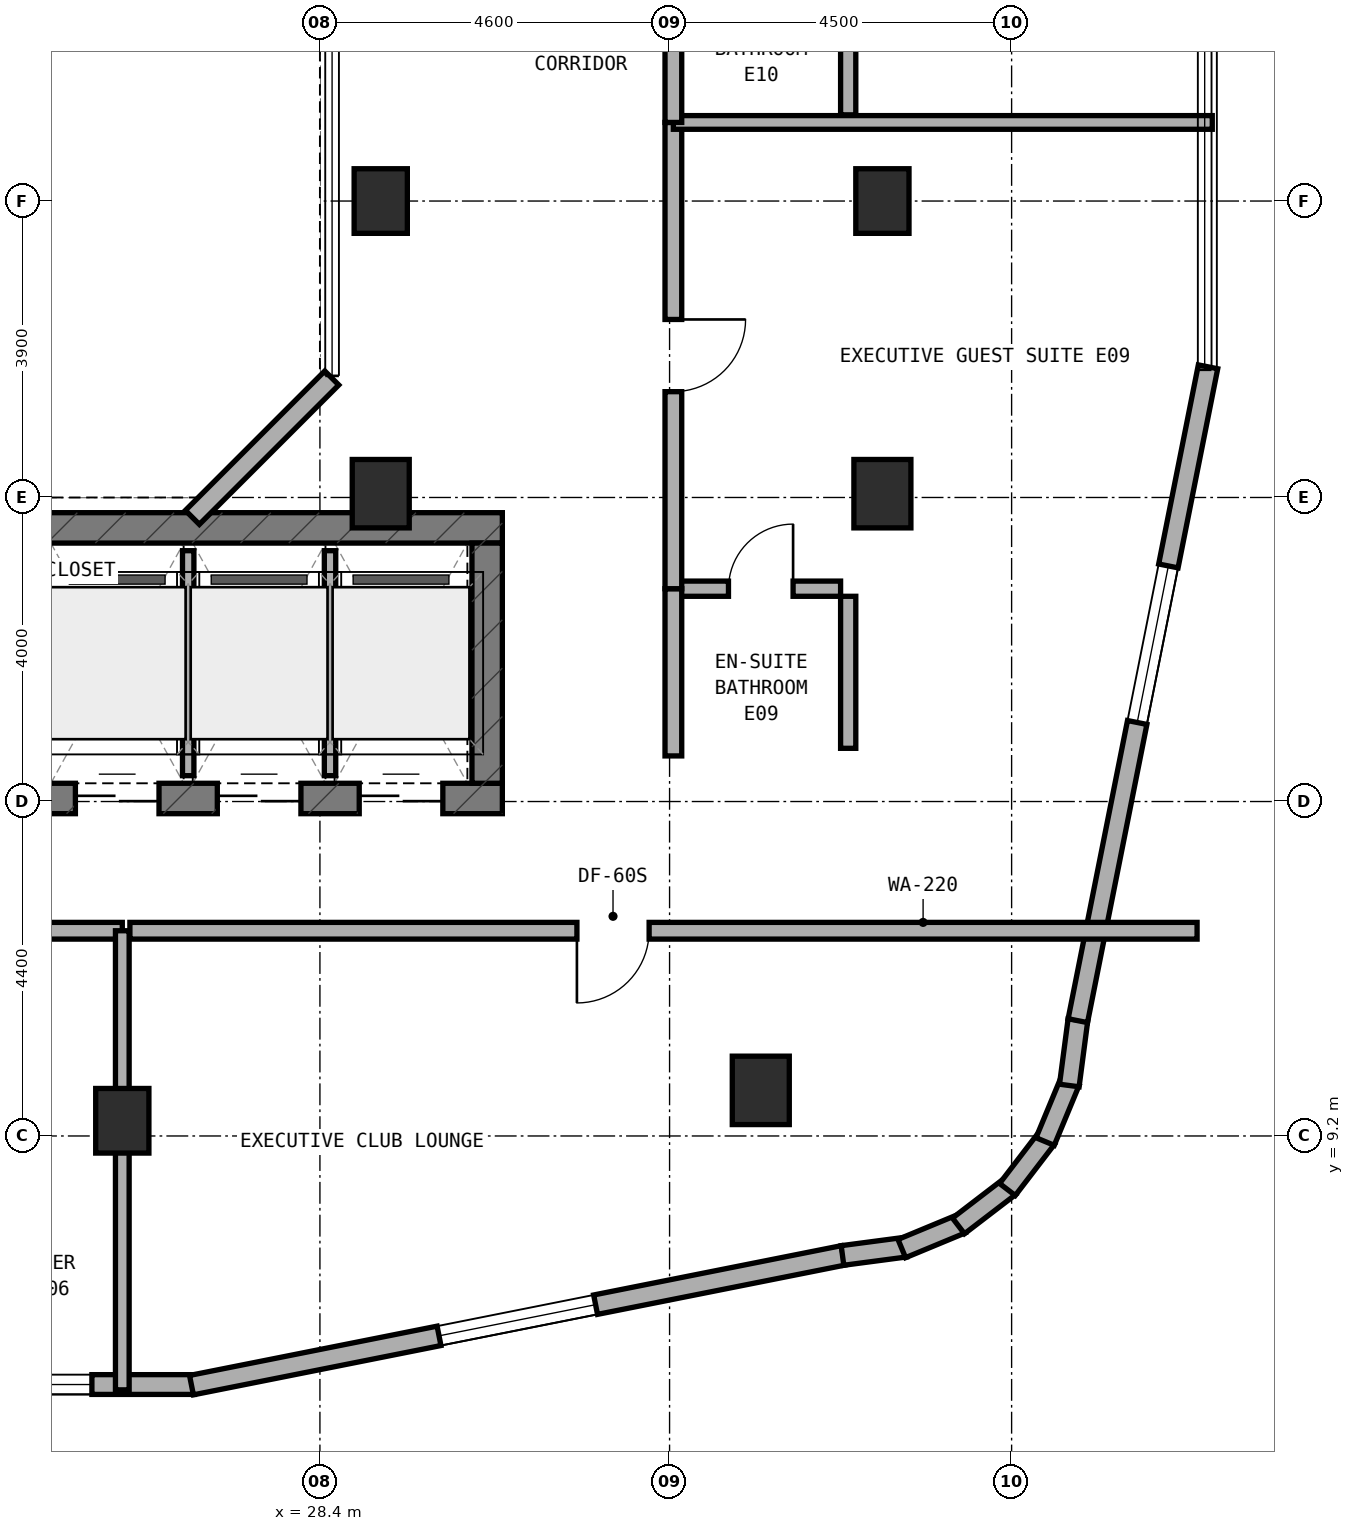
"""IFC4 building model, lengths in metres.
Left out: names, types, materials, properties, quantities, classifications, styles, units other than length and angle.
Written with IfcOpenShell. Run it as: python <this file> out.ifc"""

import sys

from ifc_helpers import new_model, si_unit, direction, frame, frame_2d, origin, origin_2d, place, context, subcontext, project, spatial, rectangle, extrude, element, fill, save


model = new_model("IFC4")
c1 = context("Model", 3, precision=1e-05, world=origin(), true_north=direction((0.0, 1.0)))
c2 = subcontext(c1, "Body", "Model", "MODEL_VIEW")
j1 = project(units=[si_unit("LENGTHUNIT", "METRE"), si_unit("PLANEANGLEUNIT", "RADIAN")], contexts=[c1])
p1 = place(None, origin())
s1 = spatial("IfcSite", under=j1, at=p1, CompositionType="ELEMENT")
p2 = place(p1, origin())
s2 = spatial("IfcBuilding", under=s1, at=p2, CompositionType="ELEMENT")
p3 = place(p2, frame((0.0, 0.0, 220.7)))
s3 = spatial("IfcBuildingStorey", under=s2, at=p3, CompositionType="ELEMENT", Elevation=220.7)
p4 = place(p3, frame((6.4, 13.64, 0.0), z_axis=(0.0, 0.0, 1.0), x_axis=(1.0, 0.0, 0.0)))
e1 = element("IfcWall", 1, at=p4, inside=s3, PredefinedType="SHEAR", context=c2, shape_type="SweptSolid", body=[
    extrude(rectangle(XDim=24.4, YDim=0.4, at=frame_2d((12.2, 0.0))), origin(), (0.0, 0.0, 1.0), 3.6),
])
p5 = place(p4, frame((9.15, 0.0, 0.0)))
e2 = element("IfcOpeningElement", 2, at=p5, cuts=e1, PredefinedType="OPENING", context=c2, shape_type="SweptSolid", body=[
    extrude(rectangle(XDim=1.2, YDim=2.15, at=frame_2d((0.6, 1.075))), frame((0.0, 0.21, 0.0), z_axis=(0.0, -1.0, 0.0), x_axis=(1.0, 0.0, 0.0)), (0.0, 0.0, 1.0), 0.42),
])
p6 = place(p4, frame((16.94, 0.0, 0.0)))
e3 = element("IfcOpeningElement", 3, at=p6, cuts=e1, PredefinedType="OPENING", context=c2, shape_type="SweptSolid", body=[
    extrude(rectangle(XDim=0.85, YDim=2.1, at=frame_2d((0.425, 1.05))), frame((0.0, 0.21, 0.0), z_axis=(0.0, -1.0, 0.0), x_axis=(1.0, 0.0, 0.0)), (0.0, 0.0, 1.0), 0.42),
])
p7 = place(p4, frame((18.783, 0.0, 0.0)))
e4 = element("IfcOpeningElement", 4, at=p7, cuts=e1, PredefinedType="OPENING", context=c2, shape_type="SweptSolid", body=[
    extrude(rectangle(XDim=1.1, YDim=2.15, at=frame_2d((0.55, 1.075))), frame((0.0, 0.21, 0.0), z_axis=(0.0, -1.0, 0.0), x_axis=(1.0, 0.0, 0.0)), (0.0, 0.0, 1.0), 0.42),
])
p8 = place(p4, frame((20.65, 0.0, 0.0)))
e5 = element("IfcOpeningElement", 5, at=p8, cuts=e1, PredefinedType="OPENING", context=c2, shape_type="SweptSolid", body=[
    extrude(rectangle(XDim=1.1, YDim=2.15, at=frame_2d((0.55, 1.075))), frame((0.0, 0.21, 0.0), z_axis=(0.0, -1.0, 0.0), x_axis=(1.0, 0.0, 0.0)), (0.0, 0.0, 1.0), 0.42),
])
p9 = place(p4, frame((22.517, 0.0, 0.0)))
e6 = element("IfcOpeningElement", 6, at=p9, cuts=e1, PredefinedType="OPENING", context=c2, shape_type="SweptSolid", body=[
    extrude(rectangle(XDim=1.1, YDim=2.15, at=frame_2d((0.55, 1.075))), frame((0.0, 0.21, 0.0), z_axis=(0.0, -1.0, 0.0), x_axis=(1.0, 0.0, 0.0)), (0.0, 0.0, 1.0), 0.42),
])
p10 = place(p3, frame((6.4, 17.2, 0.0), z_axis=(0.0, 0.0, 1.0), x_axis=(1.0, 0.0, 0.0)))
e7 = element("IfcWall", 7, at=p10, inside=s3, PredefinedType="SHEAR", context=c2, shape_type="SweptSolid", body=[
    extrude(rectangle(XDim=24.4, YDim=0.4, at=frame_2d((12.2, 0.0))), origin(), (0.0, 0.0, 1.0), 3.6),
])
p11 = place(p3, frame((30.6, 13.84, 0.0), z_axis=(0.0, 0.0, 1.0), x_axis=(0.0, 1.0, 0.0)))
e8 = element("IfcWall", 8, at=p11, inside=s3, PredefinedType="SHEAR", context=c2, shape_type="SweptSolid", body=[
    extrude(rectangle(XDim=3.16, YDim=0.4, at=frame_2d((1.58, 0.0))), origin(), (0.0, 0.0, 1.0), 3.6),
])
p12 = place(p3, frame((25.8, 9.4, 0.0), z_axis=(0.0, 0.0, 1.0), x_axis=(1.0, 0.0, 0.0)))
e9 = element("IfcColumn", 9, at=p12, inside=s3, PredefinedType="COLUMN", context=c2, shape_type="SweptSolid", body=[
    extrude(rectangle(XDim=0.7, YDim=0.85, at=origin_2d()), origin(), (0.0, 0.0, 1.0), 3.6),
])
p13 = place(p3, frame((34.2, 9.8, 0.0), z_axis=(0.0, 0.0, 1.0), x_axis=(1.0, 0.0, 0.0)))
e10 = element("IfcColumn", 10, at=p13, inside=s3, PredefinedType="COLUMN", context=c2, shape_type="SweptSolid", body=[
    extrude(rectangle(XDim=0.75, YDim=0.9, at=origin_2d()), origin(), (0.0, 0.0, 1.0), 3.6),
])
p14 = place(p3, frame((35.8, 21.5, 0.0), z_axis=(0.0, 0.0, 1.0), x_axis=(1.0, 0.0, 0.0)))
e11 = element("IfcColumn", 11, at=p14, inside=s3, PredefinedType="COLUMN", context=c2, shape_type="SweptSolid", body=[
    extrude(rectangle(XDim=0.7, YDim=0.85, at=origin_2d()), origin(), (0.0, 0.0, 1.0), 3.6),
])
for number, where, z_axis, x_axis in (
    (12, (35.8, 17.65, 0.0), (0.0, 0.0, 1.0), (1.0, 0.0, 0.0)),
    (13, (29.2, 17.65, 0.0), (0.0, 0.0, 1.0), (1.0, 0.0, 0.0)),
):
    element("IfcColumn", number, at=place(p3, frame(where, z_axis=z_axis, x_axis=x_axis)), inside=s3, PredefinedType="COLUMN", context=c2, shape_type="SweptSolid", body=[
        extrude(rectangle(XDim=0.75, YDim=0.9, at=origin_2d()), origin(), (0.0, 0.0, 1.0), 3.6),
    ])
p15 = place(p3, frame((29.2, 21.5, 0.0), z_axis=(0.0, 0.0, 1.0), x_axis=(1.0, 0.0, 0.0)))
e14 = element("IfcColumn", 14, at=p15, inside=s3, PredefinedType="COLUMN", context=c2, shape_type="SweptSolid", body=[
    extrude(rectangle(XDim=0.7, YDim=0.85, at=origin_2d()), origin(), (0.0, 0.0, 1.0), 3.6),
])
p16 = place(p3, frame((15.215, 5.93, 0.0), z_axis=(0.0, 0.0, 1.0), x_axis=(1.0, 0.0, 0.0)))
e15 = element("IfcWall", 15, at=p16, inside=s3, PredefinedType="STANDARD", context=c2, shape_type="SweptSolid", body=[
    extrude(rectangle(XDim=11.535, YDim=0.26, at=frame_2d((5.768, 0.0))), origin(), (0.0, 0.0, 1.0), 3.32),
])
p17 = place(p16, frame((5.185, 0.0, 0.0)))
e16 = element("IfcOpeningElement", 16, at=p17, cuts=e15, PredefinedType="OPENING", context=c2, shape_type="SweptSolid", body=[
    extrude(rectangle(XDim=1.2, YDim=2.15, at=frame_2d((0.6, 1.075))), frame((0.0, 0.14, 0.0), z_axis=(0.0, -1.0, 0.0), x_axis=(1.0, 0.0, 0.0)), (0.0, 0.0, 1.0), 0.28),
])
p18 = place(p16, frame((1.437, 0.0, 0.85)))
e17 = element("IfcOpeningElement", 17, at=p18, cuts=e15, PredefinedType="OPENING", context=c2, shape_type="SweptSolid", body=[
    extrude(rectangle(XDim=2.1, YDim=1.5, at=frame_2d((1.05, 0.75))), frame((0.0, 0.14, 0.0), z_axis=(0.0, -1.0, 0.0), x_axis=(1.0, 0.0, 0.0)), (0.0, 0.0, 1.0), 0.28),
])
p19 = place(p16, frame((8.085, 0.0, 0.85)))
e18 = element("IfcOpeningElement", 18, at=p19, cuts=e15, PredefinedType="OPENING", context=c2, shape_type="SweptSolid", body=[
    extrude(rectangle(XDim=2.1, YDim=1.5, at=frame_2d((1.05, 0.75))), frame((0.0, 0.14, 0.0), z_axis=(0.0, -1.0, 0.0), x_axis=(1.0, 0.0, 0.0)), (0.0, 0.0, 1.0), 0.28),
])
p20 = place(p3, frame((26.71, 5.922, 0.0), z_axis=(0.0, 0.0, 1.0), x_axis=(0.980752174324, 0.195256683773, 0.0)))
e19 = element("IfcWall", 19, at=p20, inside=s3, PredefinedType="STANDARD", context=c2, shape_type="SweptSolid", body=[
    extrude(rectangle(XDim=8.741, YDim=0.26, at=frame_2d((4.371, 0.0))), origin(), (0.0, 0.0, 1.0), 3.32),
])
p21 = place(p20, frame((3.321, 0.0, 0.85)))
e20 = element("IfcOpeningElement", 20, at=p21, cuts=e19, PredefinedType="OPENING", context=c2, shape_type="SweptSolid", body=[
    extrude(rectangle(XDim=2.1, YDim=1.5, at=frame_2d((1.05, 0.75))), frame((0.0, 0.14, 0.0), z_axis=(0.0, -1.0, 0.0), x_axis=(1.0, 0.0, 0.0)), (0.0, 0.0, 1.0), 0.28),
])
p22 = place(p3, frame((35.275, 7.628, 0.0), z_axis=(0.0, 0.0, 1.0), x_axis=(0.9913883573, 0.130954667764, 0.0)))
e21 = element("IfcWall", 21, at=p22, inside=s3, PredefinedType="STANDARD", context=c2, shape_type="SweptSolid", body=[
    extrude(rectangle(XDim=0.833, YDim=0.26, at=frame_2d((0.417, 0.0))), origin(), (0.0, 0.0, 1.0), 3.32),
])
p23 = place(p3, frame((36.055, 7.719, 0.0), z_axis=(0.0, 0.0, 1.0), x_axis=(0.923754491172, 0.382985169477, 0.0)))
e22 = element("IfcWall", 22, at=p23, inside=s3, PredefinedType="STANDARD", context=c2, shape_type="SweptSolid", body=[
    extrude(rectangle(XDim=0.851, YDim=0.26, at=frame_2d((0.426, 0.0))), origin(), (0.0, 0.0, 1.0), 3.32),
])
for number, where, z_axis, x_axis in (
    (23, (36.801, 8.017, 0.0), (0.0, 0.0, 1.0), (0.794, 0.608, 0.0)),
    (24, (37.445, 8.496, 0.0), (0.0, 0.0, 1.0), (0.608, 0.794, 0.0)),
):
    element("IfcWall", number, at=place(p3, frame(where, z_axis=z_axis, x_axis=x_axis)), inside=s3, PredefinedType="STANDARD", context=c2, shape_type="SweptSolid", body=[
        extrude(rectangle(XDim=0.85, YDim=0.26, at=frame_2d((0.425, 0.0))), origin(), (0.0, 0.0, 1.0), 3.32),
    ])
p24 = place(p3, frame((37.941, 9.127, 0.0), z_axis=(0.0, 0.0, 1.0), x_axis=(0.383229930484, 0.923652976167, 0.0)))
e25 = element("IfcWall", 25, at=p24, inside=s3, PredefinedType="STANDARD", context=c2, shape_type="SweptSolid", body=[
    extrude(rectangle(XDim=0.851, YDim=0.26, at=frame_2d((0.426, 0.0))), origin(), (0.0, 0.0, 1.0), 3.32),
])
p25 = place(p3, frame((38.259, 9.864, 0.0), z_axis=(0.0, 0.0, 1.0), x_axis=(0.130156359936, 0.991493480548, 0.0)))
e26 = element("IfcWall", 26, at=p25, inside=s3, PredefinedType="STANDARD", context=c2, shape_type="SweptSolid", body=[
    extrude(rectangle(XDim=0.868, YDim=0.26, at=frame_2d((0.434, 0.0))), origin(), (0.0, 0.0, 1.0), 3.32),
])
p26 = place(p3, frame((38.371, 10.717, 0.0), z_axis=(0.0, 0.0, 1.0), x_axis=(0.195291715883, 0.980745199176, 0.0)))
e27 = element("IfcWall", 27, at=p26, inside=s3, PredefinedType="STANDARD", context=c2, shape_type="SweptSolid", body=[
    extrude(rectangle(XDim=8.771, YDim=0.26, at=frame_2d((4.385, 0.0))), origin(), (0.0, 0.0, 1.0), 3.32),
])
p27 = place(p26, frame((4.0, 0.0, 0.85)))
e28 = element("IfcOpeningElement", 28, at=p27, cuts=e27, PredefinedType="OPENING", context=c2, shape_type="SweptSolid", body=[
    extrude(rectangle(XDim=2.1, YDim=1.5, at=frame_2d((1.05, 0.75))), frame((0.0, 0.14, 0.0), z_axis=(0.0, -1.0, 0.0), x_axis=(1.0, 0.0, 0.0)), (0.0, 0.0, 1.0), 0.28),
])
p28 = place(p3, frame((26.722, 17.338, 0.0), z_axis=(0.0, 0.0, 1.0), x_axis=(0.707059717605, 0.707153841636, 0.0)))
e29 = element("IfcWall", 29, at=p28, inside=s3, PredefinedType="STANDARD", context=c2, shape_type="SweptSolid", body=[
    extrude(rectangle(XDim=2.594, YDim=0.26, at=frame_2d((1.297, 0.0))), origin(), (0.0, 0.0, 1.0), 3.32),
])
p29 = place(p3, frame((26.667, 13.94, 0.0), z_axis=(0.0, 0.0, 1.0), x_axis=(0.0, 1.0, 0.0)))
e30 = element("IfcWall", 30, at=p29, inside=s3, PredefinedType="PARTITIONING", context=c2, shape_type="SweptSolid", body=[
    extrude(rectangle(XDim=2.96, YDim=0.15, at=frame_2d((1.48, 0.0))), origin(), (0.0, 0.0, 1.0), 3.32),
])
p30 = place(p3, frame((28.533, 13.94, 0.0), z_axis=(0.0, 0.0, 1.0), x_axis=(0.0, 1.0, 0.0)))
e31 = element("IfcWall", 31, at=p30, inside=s3, PredefinedType="PARTITIONING", context=c2, shape_type="SweptSolid", body=[
    extrude(rectangle(XDim=2.96, YDim=0.15, at=frame_2d((1.48, 0.0))), origin(), (0.0, 0.0, 1.0), 2.695),
])
p31 = place(p3, frame((11.15, 11.9, 0.0), z_axis=(0.0, 0.0, 1.0), x_axis=(1.0, 0.0, 0.0)))
e32 = element("IfcWall", 32, at=p31, inside=s3, PredefinedType="SOLIDWALL", context=c2, shape_type="SweptSolid", body=[
    extrude(rectangle(XDim=14.65, YDim=0.22, at=frame_2d((7.325, 0.0))), origin(), (0.0, 0.0, 1.0), 2.695),
])
p32 = place(p31, frame((6.85, 0.0, 0.0)))
e33 = element("IfcOpeningElement", 33, at=p32, cuts=e32, PredefinedType="OPENING", context=c2, shape_type="SweptSolid", body=[
    extrude(rectangle(XDim=0.95, YDim=2.1, at=frame_2d((0.475, 1.05))), frame((0.0, 0.12, 0.0), z_axis=(0.0, -1.0, 0.0), x_axis=(1.0, 0.0, 0.0)), (0.0, 0.0, 1.0), 0.24),
])
p33 = place(p3, frame((25.8, 5.86, 0.0), z_axis=(0.0, 0.0, 1.0), x_axis=(0.0, 1.0, 0.0)))
e34 = element("IfcWall", 34, at=p33, inside=s3, PredefinedType="SOLIDWALL", context=c2, shape_type="SweptSolid", body=[
    extrude(rectangle(XDim=6.04, YDim=0.18, at=frame_2d((3.02, 0.0))), origin(), (0.0, 0.0, 1.0), 2.695),
])
p34 = place(p3, frame((25.9, 11.9, 0.0), z_axis=(0.0, 0.0, 1.0), x_axis=(1.0, 0.0, 0.0)))
e35 = element("IfcWall", 35, at=p34, inside=s3, PredefinedType="SOLIDWALL", context=c2, shape_type="SweptSolid", body=[
    extrude(rectangle(XDim=14.04, YDim=0.22, at=frame_2d((7.02, 0.0))), origin(), (0.0, 0.0, 1.0), 2.695),
])
p35 = place(p34, frame((5.881, 0.0, 0.0)))
e36 = element("IfcOpeningElement", 36, at=p35, cuts=e35, PredefinedType="OPENING", context=c2, shape_type="SweptSolid", body=[
    extrude(rectangle(XDim=0.95, YDim=2.1, at=frame_2d((0.475, 1.05))), frame((0.0, 0.12, 0.0), z_axis=(0.0, -1.0, 0.0), x_axis=(1.0, 0.0, 0.0)), (0.0, 0.0, 1.0), 0.24),
])
p36 = place(p3, frame((33.15, 16.4, 0.0), z_axis=(0.0, 0.0, 1.0), x_axis=(1.0, 0.0, 0.0)))
e37 = element("IfcWall", 37, at=p36, inside=s3, PredefinedType="PLUMBINGWALL", context=c2, shape_type="SweptSolid", body=[
    extrude(rectangle(XDim=2.1, YDim=0.2, at=frame_2d((1.05, 0.0))), origin(), (0.0, 0.0, 1.0), 3.32),
])
p37 = place(p36, frame((0.625, 0.0, 0.0)))
e38 = element("IfcOpeningElement", 38, at=p37, cuts=e37, PredefinedType="OPENING", context=c2, shape_type="SweptSolid", body=[
    extrude(rectangle(XDim=0.85, YDim=2.1, at=frame_2d((0.425, 1.05))), frame((0.0, 0.11, 0.0), z_axis=(0.0, -1.0, 0.0), x_axis=(1.0, 0.0, 0.0)), (0.0, 0.0, 1.0), 0.22),
])
p38 = place(p3, frame((35.35, 14.3, 0.0), z_axis=(0.0, 0.0, 1.0), x_axis=(0.0, 1.0, 0.0)))
e39 = element("IfcWall", 39, at=p38, inside=s3, PredefinedType="PLUMBINGWALL", context=c2, shape_type="SweptSolid", body=[
    extrude(rectangle(XDim=2.0, YDim=0.2, at=frame_2d((1.0, 0.0))), origin(), (0.0, 0.0, 1.0), 3.015),
])
p39 = place(p3, frame((33.05, 14.2, 0.0), z_axis=(0.0, 0.0, 1.0), x_axis=(0.0, 1.0, 0.0)))
e40 = element("IfcWall", 40, at=p39, inside=s3, PredefinedType="SOLIDWALL", context=c2, shape_type="SweptSolid", body=[
    extrude(rectangle(XDim=2.2, YDim=0.22, at=frame_2d((1.1, 0.0))), origin(), (0.0, 0.0, 1.0), 3.32),
])
p40 = place(p3, frame((33.05, 16.4, 0.0), z_axis=(0.0, 0.0, 1.0), x_axis=(0.0, 1.0, 0.0)))
e41 = element("IfcWall", 41, at=p40, inside=s3, PredefinedType="SOLIDWALL", context=c2, shape_type="SweptSolid", body=[
    extrude(rectangle(XDim=6.134, YDim=0.22, at=frame_2d((3.067, 0.0))), origin(), (0.0, 0.0, 1.0), 2.695),
])
p41 = place(p40, frame((2.592, 0.0, 0.0)))
e42 = element("IfcOpeningElement", 42, at=p41, cuts=e41, PredefinedType="OPENING", context=c2, shape_type="SweptSolid", body=[
    extrude(rectangle(XDim=0.95, YDim=2.1, at=frame_2d((0.475, 1.05))), frame((0.0, 0.12, 0.0), z_axis=(0.0, -1.0, 0.0), x_axis=(1.0, 0.0, 0.0)), (0.0, 0.0, 1.0), 0.24),
])
p42 = place(p3, frame((33.05, 22.534, 0.0), z_axis=(0.0, 0.0, 1.0), x_axis=(1.0, 0.0, 0.0)))
e43 = element("IfcWall", 43, at=p42, inside=s3, PredefinedType="SOLIDWALL", context=c2, shape_type="SweptSolid", body=[
    extrude(rectangle(XDim=7.09, YDim=0.18, at=frame_2d((3.545, 0.0))), origin(), (0.0, 0.0, 1.0), 3.015),
])
p43 = place(p3, frame((35.35, 22.634, 0.0), z_axis=(0.0, 0.0, 1.0), x_axis=(0.0, 1.0, 0.0)))
e44 = element("IfcWall", 44, at=p43, inside=s3, PredefinedType="PLUMBINGWALL", context=c2, shape_type="SweptSolid", body=[
    extrude(rectangle(XDim=2.0, YDim=0.2, at=frame_2d((1.0, 0.0))), origin(), (0.0, 0.0, 1.0), 3.32),
])
p44 = place(p3, frame((33.05, 22.534, 0.0), z_axis=(0.0, 0.0, 1.0), x_axis=(0.0, 1.0, 0.0)))
e45 = element("IfcWall", 45, at=p44, inside=s3, PredefinedType="SOLIDWALL", context=c2, shape_type="SweptSolid", body=[
    extrude(rectangle(XDim=2.2, YDim=0.22, at=frame_2d((1.1, 0.0))), origin(), (0.0, 0.0, 1.0), 3.32),
])
p45 = place(p19, origin())
e46 = element("IfcWindow", 46, at=p45, inside=s3, PartitioningType="SINGLE_PANEL", PredefinedType="WINDOW", context=c2, shape_type="SweptSolid", body=[
    extrude(rectangle(XDim=2.1, YDim=1.5, at=frame_2d((1.05, 0.75))), frame((0.0, 0.03, 0.0), z_axis=(0.0, -1.0, 0.0), x_axis=(1.0, 0.0, 0.0)), (0.0, 0.0, 1.0), 0.06),
])
fill(e18, e46)
p46 = place(p21, origin())
e47 = element("IfcWindow", 47, at=p46, inside=s3, PartitioningType="SINGLE_PANEL", PredefinedType="WINDOW", context=c2, shape_type="SweptSolid", body=[
    extrude(rectangle(XDim=2.1, YDim=1.5, at=frame_2d((1.05, 0.75))), frame((0.0, 0.03, 0.0), z_axis=(0.0, -1.0, 0.0), x_axis=(1.0, 0.0, 0.0)), (0.0, 0.0, 1.0), 0.06),
])
fill(e20, e47)
p47 = place(p27, origin())
e48 = element("IfcWindow", 48, at=p47, inside=s3, PartitioningType="SINGLE_PANEL", PredefinedType="WINDOW", context=c2, shape_type="SweptSolid", body=[
    extrude(rectangle(XDim=2.1, YDim=1.5, at=frame_2d((1.05, 0.75))), frame((0.0, 0.03, 0.0), z_axis=(0.0, -1.0, 0.0), x_axis=(1.0, 0.0, 0.0)), (0.0, 0.0, 1.0), 0.06),
])
fill(e28, e48)
p48 = place(p7, frame((1.1, 0.0, 0.0), z_axis=(0.0, 0.0, 1.0), x_axis=(-1.0, 0.0, 0.0)))
e49 = element("IfcDoor", 49, at=p48, inside=s3, OperationType="DOUBLE_DOOR_SLIDING", PredefinedType="DOOR", context=c2, shape_type="SweptSolid", body=[
    extrude(rectangle(XDim=1.1, YDim=2.15, at=frame_2d((0.55, 1.075))), frame((0.0, 0.025, 0.0), z_axis=(0.0, -1.0, 0.0), x_axis=(1.0, 0.0, 0.0)), (0.0, 0.0, 1.0), 0.05),
])
fill(e4, e49)
p49 = place(p8, frame((1.1, 0.0, 0.0), z_axis=(0.0, 0.0, 1.0), x_axis=(-1.0, 0.0, 0.0)))
e50 = element("IfcDoor", 50, at=p49, inside=s3, OperationType="DOUBLE_DOOR_SLIDING", PredefinedType="DOOR", context=c2, shape_type="SweptSolid", body=[
    extrude(rectangle(XDim=1.1, YDim=2.15, at=frame_2d((0.55, 1.075))), frame((0.0, 0.025, 0.0), z_axis=(0.0, -1.0, 0.0), x_axis=(1.0, 0.0, 0.0)), (0.0, 0.0, 1.0), 0.05),
])
fill(e5, e50)
p50 = place(p9, frame((1.1, 0.0, 0.0), z_axis=(0.0, 0.0, 1.0), x_axis=(-1.0, 0.0, 0.0)))
e51 = element("IfcDoor", 51, at=p50, inside=s3, OperationType="DOUBLE_DOOR_SLIDING", PredefinedType="DOOR", context=c2, shape_type="SweptSolid", body=[
    extrude(rectangle(XDim=1.1, YDim=2.15, at=frame_2d((0.55, 1.075))), frame((0.0, 0.025, 0.0), z_axis=(0.0, -1.0, 0.0), x_axis=(1.0, 0.0, 0.0)), (0.0, 0.0, 1.0), 0.05),
])
fill(e6, e51)
p51 = place(p35, frame((0.95, 0.0, 0.0), z_axis=(0.0, 0.0, 1.0), x_axis=(-1.0, 0.0, 0.0)))
e52 = element("IfcDoor", 52, at=p51, inside=s3, OperationType="SINGLE_SWING_RIGHT", PredefinedType="DOOR", context=c2, shape_type="SweptSolid", body=[
    extrude(rectangle(XDim=0.95, YDim=2.1, at=frame_2d((0.475, 1.05))), frame((0.0, 0.025, 0.0), z_axis=(0.0, -1.0, 0.0), x_axis=(1.0, 0.0, 0.0)), (0.0, 0.0, 1.0), 0.05),
])
fill(e36, e52)
p52 = place(p37, origin())
e53 = element("IfcDoor", 53, at=p52, inside=s3, OperationType="SINGLE_SWING_RIGHT", PredefinedType="DOOR", context=c2, shape_type="SweptSolid", body=[
    extrude(rectangle(XDim=0.85, YDim=2.1, at=frame_2d((0.425, 1.05))), frame((0.0, 0.025, 0.0), z_axis=(0.0, -1.0, 0.0), x_axis=(1.0, 0.0, 0.0)), (0.0, 0.0, 1.0), 0.05),
])
fill(e38, e53)
p53 = place(p41, frame((0.95, 0.0, 0.0), z_axis=(0.0, 0.0, 1.0), x_axis=(-1.0, 0.0, 0.0)))
e54 = element("IfcDoor", 54, at=p53, inside=s3, OperationType="SINGLE_SWING_LEFT", PredefinedType="DOOR", context=c2, shape_type="SweptSolid", body=[
    extrude(rectangle(XDim=0.95, YDim=2.1, at=frame_2d((0.475, 1.05))), frame((0.0, 0.025, 0.0), z_axis=(0.0, -1.0, 0.0), x_axis=(1.0, 0.0, 0.0)), (0.0, 0.0, 1.0), 0.05),
])
fill(e42, e54)
save(model, sys.argv[1])
